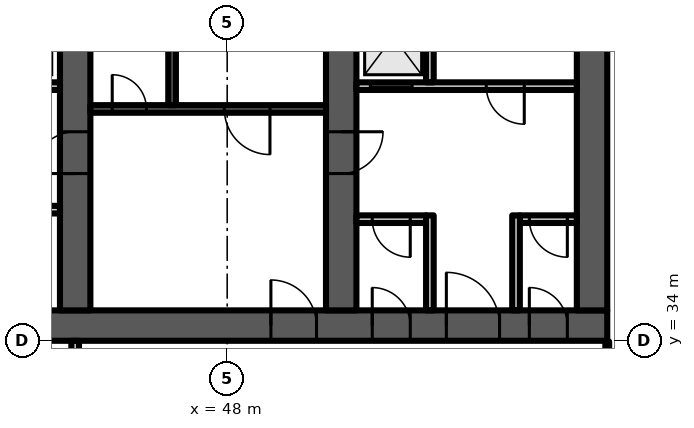
"""IFC4 building model, lengths in metres.
Left out: names, types, materials, properties, quantities, classifications, styles, units other than length and angle.
Written with IfcOpenShell. Run it as: python <this file> out.ifc"""

import sys

from ifc_helpers import new_model, si_unit, direction, frame, frame_2d, origin, place, context, subcontext, project, spatial, polyline, rectangle, outline, extrude, element, fill, save


model = new_model("IFC4")
c1 = context("Model", 3, precision=1e-05, world=origin(), true_north=direction((0.0, 1.0)))
c2 = subcontext(c1, "Body", "Model", "MODEL_VIEW")
j1 = project(units=[si_unit("LENGTHUNIT", "METRE"), si_unit("PLANEANGLEUNIT", "RADIAN")], contexts=[c1])
p1 = place(None, origin())
s1 = spatial("IfcSite", under=j1, at=p1, CompositionType="ELEMENT")
p2 = place(p1, origin())
s2 = spatial("IfcBuilding", under=s1, at=p2, CompositionType="ELEMENT")
p3 = place(p2, frame((0.0, 0.0, 151.9)))
s3 = spatial("IfcBuildingStorey", under=s2, at=p3, CompositionType="ELEMENT", Elevation=151.9)
p4 = place(p3, frame((16.0, 34.4, 0.0), z_axis=(0.0, 0.0, 1.0), x_axis=(1.0, 0.0, 0.0)))
e1 = element("IfcWall", 1, at=p4, inside=s3, PredefinedType="SHEAR", context=c2, shape_type="SweptSolid", body=[
    extrude(rectangle(XDim=42.0, YDim=0.8, at=frame_2d((21.0, 0.0))), origin(), (0.0, 0.0, 1.0), 3.6),
])
p5 = place(p4, frame((3.2, 0.0, 0.0)))
e2 = element("IfcOpeningElement", 2, at=p5, cuts=e1, PredefinedType="OPENING", context=c2, shape_type="SweptSolid", body=[
    extrude(rectangle(XDim=1.0, YDim=2.1, at=frame_2d((0.5, 1.05))), frame((0.0, 0.41, 0.0), z_axis=(0.0, -1.0, 0.0), x_axis=(1.0, 0.0, 0.0)), (0.0, 0.0, 1.0), 0.82),
])
p6 = place(p4, frame((7.65, 0.0, 0.0)))
e3 = element("IfcOpeningElement", 3, at=p6, cuts=e1, PredefinedType="OPENING", context=c2, shape_type="SweptSolid", body=[
    extrude(rectangle(XDim=1.2, YDim=2.1, at=frame_2d((0.6, 1.05))), frame((0.0, 0.41, 0.0), z_axis=(0.0, -1.0, 0.0), x_axis=(1.0, 0.0, 0.0)), (0.0, 0.0, 1.0), 0.82),
])
p7 = place(p4, frame((14.767, 0.0, 0.0)))
e4 = element("IfcOpeningElement", 4, at=p7, cuts=e1, PredefinedType="OPENING", context=c2, shape_type="SweptSolid", body=[
    extrude(rectangle(XDim=1.1, YDim=2.1, at=frame_2d((0.55, 1.05))), frame((0.0, 0.41, 0.0), z_axis=(0.0, -1.0, 0.0), x_axis=(1.0, 0.0, 0.0)), (0.0, 0.0, 1.0), 0.82),
])
p8 = place(p4, frame((19.133, 0.0, 0.0)))
e5 = element("IfcOpeningElement", 5, at=p8, cuts=e1, PredefinedType="OPENING", context=c2, shape_type="SweptSolid", body=[
    extrude(rectangle(XDim=1.1, YDim=2.1, at=frame_2d((0.55, 1.05))), frame((0.0, 0.41, 0.0), z_axis=(0.0, -1.0, 0.0), x_axis=(1.0, 0.0, 0.0)), (0.0, 0.0, 1.0), 0.82),
])
p9 = place(p4, frame((16.8, 0.0, 0.0)))
e6 = element("IfcOpeningElement", 6, at=p9, cuts=e1, PredefinedType="OPENING", context=c2, shape_type="SweptSolid", body=[
    extrude(rectangle(XDim=1.4, YDim=2.1, at=frame_2d((0.7, 1.05))), frame((0.0, 0.41, 0.0), z_axis=(0.0, -1.0, 0.0), x_axis=(1.0, 0.0, 0.0)), (0.0, 0.0, 1.0), 0.82),
])
p10 = place(p4, frame((21.767, 0.0, 0.0)))
e7 = element("IfcOpeningElement", 7, at=p10, cuts=e1, PredefinedType="OPENING", context=c2, shape_type="SweptSolid", body=[
    extrude(rectangle(XDim=1.1, YDim=2.1, at=frame_2d((0.55, 1.05))), frame((0.0, 0.41, 0.0), z_axis=(0.0, -1.0, 0.0), x_axis=(1.0, 0.0, 0.0)), (0.0, 0.0, 1.0), 0.82),
])
p11 = place(p4, frame((23.95, 0.0, 0.0)))
e8 = element("IfcOpeningElement", 8, at=p11, cuts=e1, PredefinedType="OPENING", context=c2, shape_type="SweptSolid", body=[
    extrude(rectangle(XDim=1.1, YDim=2.1, at=frame_2d((0.55, 1.05))), frame((0.0, 0.41, 0.0), z_axis=(0.0, -1.0, 0.0), x_axis=(1.0, 0.0, 0.0)), (0.0, 0.0, 1.0), 0.82),
])
p12 = place(p4, frame((26.133, 0.0, 0.0)))
e9 = element("IfcOpeningElement", 9, at=p12, cuts=e1, PredefinedType="OPENING", context=c2, shape_type="SweptSolid", body=[
    extrude(rectangle(XDim=1.1, YDim=2.1, at=frame_2d((0.55, 1.05))), frame((0.0, 0.41, 0.0), z_axis=(0.0, -1.0, 0.0), x_axis=(1.0, 0.0, 0.0)), (0.0, 0.0, 1.0), 0.82),
])
p13 = place(p4, frame((33.15, 0.0, 0.0)))
e10 = element("IfcOpeningElement", 10, at=p13, cuts=e1, PredefinedType="OPENING", context=c2, shape_type="SweptSolid", body=[
    extrude(rectangle(XDim=1.2, YDim=2.1, at=frame_2d((0.6, 1.05))), frame((0.0, 0.41, 0.0), z_axis=(0.0, -1.0, 0.0), x_axis=(1.0, 0.0, 0.0)), (0.0, 0.0, 1.0), 0.82),
])
p14 = place(p4, frame((35.817, 0.0, 0.0)))
e11 = element("IfcOpeningElement", 11, at=p14, cuts=e1, PredefinedType="OPENING", context=c2, shape_type="SweptSolid", body=[
    extrude(rectangle(XDim=1.0, YDim=2.1, at=frame_2d((0.5, 1.05))), frame((0.0, 0.41, 0.0), z_axis=(0.0, -1.0, 0.0), x_axis=(1.0, 0.0, 0.0)), (0.0, 0.0, 1.0), 0.82),
])
p15 = place(p4, frame((39.95, 0.0, 0.0)))
e12 = element("IfcOpeningElement", 12, at=p15, cuts=e1, PredefinedType="OPENING", context=c2, shape_type="SweptSolid", body=[
    extrude(rectangle(XDim=1.0, YDim=2.1, at=frame_2d((0.5, 1.05))), frame((0.0, 0.41, 0.0), z_axis=(0.0, -1.0, 0.0), x_axis=(1.0, 0.0, 0.0)), (0.0, 0.0, 1.0), 0.82),
])
p16 = place(p4, frame((37.767, 0.0, 0.0)))
e13 = element("IfcOpeningElement", 13, at=p16, cuts=e1, PredefinedType="OPENING", context=c2, shape_type="SweptSolid", body=[
    extrude(rectangle(XDim=1.4, YDim=2.1, at=frame_2d((0.7, 1.05))), frame((0.0, 0.41, 0.0), z_axis=(0.0, -1.0, 0.0), x_axis=(1.0, 0.0, 0.0)), (0.0, 0.0, 1.0), 0.82),
])
p17 = place(p3, frame((44.0, 34.8, 0.0), z_axis=(0.0, 0.0, 1.0), x_axis=(0.0, 1.0, 0.0)))
e14 = element("IfcWall", 14, at=p17, inside=s3, PredefinedType="SHEAR", context=c2, shape_type="SweptSolid", body=[
    extrude(rectangle(XDim=14.374, YDim=0.8, at=frame_2d((7.187, 0.0))), origin(), (0.0, 0.0, 1.0), 3.6),
])
p18 = place(p17, frame((11.312, 0.0, 0.0)))
e15 = element("IfcOpeningElement", 15, at=p18, cuts=e14, PredefinedType="OPENING", context=c2, shape_type="SweptSolid", body=[
    extrude(rectangle(XDim=1.0, YDim=2.1, at=frame_2d((0.5, 1.05))), frame((0.0, 0.41, 0.0), z_axis=(0.0, -1.0, 0.0), x_axis=(1.0, 0.0, 0.0)), (0.0, 0.0, 1.0), 0.82),
])
p19 = place(p17, frame((3.6, 0.0, 0.0)))
e16 = element("IfcOpeningElement", 16, at=p19, cuts=e14, PredefinedType="OPENING", context=c2, shape_type="SweptSolid", body=[
    extrude(rectangle(XDim=1.1, YDim=2.1, at=frame_2d((0.55, 1.05))), frame((0.0, 0.41, 0.0), z_axis=(0.0, -1.0, 0.0), x_axis=(1.0, 0.0, 0.0)), (0.0, 0.0, 1.0), 0.82),
])
p20 = place(p3, frame((51.0, 34.8, 0.0), z_axis=(0.0, 0.0, 1.0), x_axis=(0.0, 1.0, 0.0)))
e17 = element("IfcWall", 17, at=p20, inside=s3, PredefinedType="SHEAR", context=c2, shape_type="SweptSolid", body=[
    extrude(rectangle(XDim=13.762, YDim=0.8, at=frame_2d((6.881, 0.0))), origin(), (0.0, 0.0, 1.0), 3.6),
])
p21 = place(p20, frame((3.6, 0.0, 0.0)))
e18 = element("IfcOpeningElement", 18, at=p21, cuts=e17, PredefinedType="OPENING", context=c2, shape_type="SweptSolid", body=[
    extrude(rectangle(XDim=1.1, YDim=2.1, at=frame_2d((0.55, 1.05))), frame((0.0, 0.41, 0.0), z_axis=(0.0, -1.0, 0.0), x_axis=(1.0, 0.0, 0.0)), (0.0, 0.0, 1.0), 0.82),
])
p22 = place(p3, frame((57.6, 34.8, 0.0), z_axis=(0.0, 0.0, 1.0), x_axis=(0.0, 1.0, 0.0)))
e19 = element("IfcWall", 19, at=p22, inside=s3, PredefinedType="SHEAR", context=c2, shape_type="SweptSolid", body=[
    extrude(rectangle(XDim=13.184, YDim=0.8, at=frame_2d((6.592, 0.0))), origin(), (0.0, 0.0, 1.0), 3.6),
])
p23 = place(p3, frame((37.4, 40.7, 0.0), z_axis=(0.0, 0.0, 1.0), x_axis=(1.0, 0.0, 0.0)))
e20 = element("IfcWall", 20, at=p23, inside=s3, PredefinedType="PARTITIONING", context=c2, shape_type="SweptSolid", body=[
    extrude(rectangle(XDim=6.2, YDim=0.2, at=frame_2d((3.1, 0.0))), origin(), (0.0, 0.0, 1.0), 3.2),
])
p24 = place(p23, frame((0.367, 0.0, 0.0)))
e21 = element("IfcOpeningElement", 21, at=p24, cuts=e20, PredefinedType="OPENING", context=c2, shape_type="SweptSolid", body=[
    extrude(rectangle(XDim=1.1, YDim=2.1, at=frame_2d((0.55, 1.05))), frame((0.0, 0.11, 0.0), z_axis=(0.0, -1.0, 0.0), x_axis=(1.0, 0.0, 0.0)), (0.0, 0.0, 1.0), 0.22),
])
p25 = place(p23, frame((2.55, 0.0, 0.0)))
e22 = element("IfcOpeningElement", 22, at=p25, cuts=e20, PredefinedType="OPENING", context=c2, shape_type="SweptSolid", body=[
    extrude(rectangle(XDim=1.1, YDim=2.1, at=frame_2d((0.55, 1.05))), frame((0.0, 0.11, 0.0), z_axis=(0.0, -1.0, 0.0), x_axis=(1.0, 0.0, 0.0)), (0.0, 0.0, 1.0), 0.22),
])
p26 = place(p23, frame((4.733, 0.0, 0.0)))
e23 = element("IfcOpeningElement", 23, at=p26, cuts=e20, PredefinedType="OPENING", context=c2, shape_type="SweptSolid", body=[
    extrude(rectangle(XDim=1.1, YDim=2.1, at=frame_2d((0.55, 1.05))), frame((0.0, 0.11, 0.0), z_axis=(0.0, -1.0, 0.0), x_axis=(1.0, 0.0, 0.0)), (0.0, 0.0, 1.0), 0.22),
])
p27 = place(p3, origin())
e24 = element("IfcWall", 24, at=p27, inside=s3, PredefinedType="PARTITIONING", context=c2, shape_type="SweptSolid", body=[
    extrude(outline(polyline([(41.567, 37.1), (39.433, 37.1), (39.433, 34.8), (39.233, 34.8), (39.233, 37.65), (37.4, 37.65), (37.4, 37.85), (39.233, 37.85), (39.433, 37.85), (39.433, 37.3), (41.567, 37.3), (41.567, 37.55), (41.767, 37.55), (43.6, 37.55), (43.6, 37.35), (41.767, 37.35), (41.767, 34.8), (41.567, 34.8), (41.567, 37.1)])), origin(), (0.0, 0.0, 1.0), 3.2),
])
p28 = place(p3, origin())
e25 = element("IfcWall", 25, at=p28, inside=s3, PredefinedType="PARTITIONING", context=c2, shape_type="SweptSolid", body=[
    extrude(outline(polyline([(39.433, 40.8), (39.233, 40.8), (39.233, 43.8), (37.4, 43.8), (37.4, 44.0), (43.6, 44.0), (43.6, 43.8), (41.767, 43.8), (41.767, 40.8), (41.567, 40.8), (41.567, 43.8), (39.433, 43.8), (39.433, 40.8)])), origin(), (0.0, 0.0, 1.0), 3.2),
])
p29 = place(p3, frame((44.4, 40.1, 0.0), z_axis=(0.0, 0.0, 1.0), x_axis=(1.0, 0.0, 0.0)))
e26 = element("IfcWall", 26, at=p29, inside=s3, PredefinedType="SHEAR", context=c2, shape_type="SweptSolid", body=[
    extrude(rectangle(XDim=6.2, YDim=0.2, at=frame_2d((3.1, 0.0))), origin(), (0.0, 0.0, 1.0), 3.2),
])
p30 = place(p29, frame((3.525, 0.0, 0.0)))
e27 = element("IfcOpeningElement", 27, at=p30, cuts=e26, PredefinedType="OPENING", context=c2, shape_type="SweptSolid", body=[
    extrude(rectangle(XDim=1.2, YDim=2.1, at=frame_2d((0.6, 1.05))), frame((0.0, 0.11, 0.0), z_axis=(0.0, -1.0, 0.0), x_axis=(1.0, 0.0, 0.0)), (0.0, 0.0, 1.0), 0.22),
])
p31 = place(p29, frame((0.575, 0.0, 0.0)))
e28 = element("IfcOpeningElement", 28, at=p31, cuts=e26, PredefinedType="OPENING", context=c2, shape_type="SweptSolid", body=[
    extrude(rectangle(XDim=0.9, YDim=2.1, at=frame_2d((0.45, 1.05))), frame((0.0, 0.11, 0.0), z_axis=(0.0, -1.0, 0.0), x_axis=(1.0, 0.0, 0.0)), (0.0, 0.0, 1.0), 0.22),
])
p32 = place(p3, frame((46.55, 40.2, 0.0), z_axis=(0.0, 0.0, 1.0), x_axis=(0.0, 1.0, 0.0)))
e29 = element("IfcWall", 29, at=p32, inside=s3, PredefinedType="SHEAR", context=c2, shape_type="SweptSolid", body=[
    extrude(rectangle(XDim=7.2, YDim=0.2, at=frame_2d((3.6, 0.0))), origin(), (0.0, 0.0, 1.0), 3.2),
])
p33 = place(p3, frame((51.4, 37.2, 0.0), z_axis=(0.0, 0.0, 1.0), x_axis=(1.0, 0.0, 0.0)))
e30 = element("IfcWall", 30, at=p33, inside=s3, PredefinedType="PARTITIONING", context=c2, shape_type="SweptSolid", body=[
    extrude(rectangle(XDim=1.833, YDim=0.2, at=frame_2d((0.917, 0.0))), origin(), (0.0, 0.0, 1.0), 3.2),
])
p34 = place(p33, frame((0.417, 0.0, 0.0)))
e31 = element("IfcOpeningElement", 31, at=p34, cuts=e30, PredefinedType="OPENING", context=c2, shape_type="SweptSolid", body=[
    extrude(rectangle(XDim=1.0, YDim=2.1, at=frame_2d((0.5, 1.05))), frame((0.0, 0.11, 0.0), z_axis=(0.0, -1.0, 0.0), x_axis=(1.0, 0.0, 0.0)), (0.0, 0.0, 1.0), 0.22),
])
p35 = place(p3, frame((55.7, 37.2, 0.0), z_axis=(0.0, 0.0, 1.0), x_axis=(1.0, 0.0, 0.0)))
e32 = element("IfcWall", 32, at=p35, inside=s3, PredefinedType="PARTITIONING", context=c2, shape_type="SweptSolid", body=[
    extrude(rectangle(XDim=1.5, YDim=0.2, at=frame_2d((0.75, 0.0))), origin(), (0.0, 0.0, 1.0), 3.2),
])
p36 = place(p35, frame((0.25, 0.0, 0.0)))
e33 = element("IfcOpeningElement", 33, at=p36, cuts=e32, PredefinedType="OPENING", context=c2, shape_type="SweptSolid", body=[
    extrude(rectangle(XDim=1.0, YDim=2.1, at=frame_2d((0.5, 1.05))), frame((0.0, 0.11, 0.0), z_axis=(0.0, -1.0, 0.0), x_axis=(1.0, 0.0, 0.0)), (0.0, 0.0, 1.0), 0.22),
])
p37 = place(p3, frame((51.4, 40.7, 0.0), z_axis=(0.0, 0.0, 1.0), x_axis=(1.0, 0.0, 0.0)))
e34 = element("IfcWall", 34, at=p37, inside=s3, PredefinedType="PARTITIONING", context=c2, shape_type="SweptSolid", body=[
    extrude(rectangle(XDim=5.8, YDim=0.2, at=frame_2d((2.9, 0.0))), origin(), (0.0, 0.0, 1.0), 3.2),
])
p38 = place(p37, frame((0.367, 0.0, 0.0)))
e35 = element("IfcOpeningElement", 35, at=p38, cuts=e34, PredefinedType="OPENING", context=c2, shape_type="SweptSolid", body=[
    extrude(rectangle(XDim=1.1, YDim=2.1, at=frame_2d((0.55, 1.05))), frame((0.0, 0.11, 0.0), z_axis=(0.0, -1.0, 0.0), x_axis=(1.0, 0.0, 0.0)), (0.0, 0.0, 1.0), 0.22),
])
p39 = place(p37, frame((3.417, 0.0, 0.0)))
e36 = element("IfcOpeningElement", 36, at=p39, cuts=e34, PredefinedType="OPENING", context=c2, shape_type="SweptSolid", body=[
    extrude(rectangle(XDim=1.0, YDim=2.1, at=frame_2d((0.5, 1.05))), frame((0.0, 0.11, 0.0), z_axis=(0.0, -1.0, 0.0), x_axis=(1.0, 0.0, 0.0)), (0.0, 0.0, 1.0), 0.22),
])
p40 = place(p3, origin())
e37 = element("IfcWall", 37, at=p40, inside=s3, PredefinedType="PARTITIONING", context=c2, shape_type="SweptSolid", body=[
    extrude(outline(polyline([(53.233, 34.8), (53.233, 37.3), (53.433, 37.3), (53.433, 34.8), (53.233, 34.8)])), origin(), (0.0, 0.0, 1.0), 3.2),
])
p41 = place(p3, origin())
e38 = element("IfcWall", 38, at=p41, inside=s3, PredefinedType="PARTITIONING", context=c2, shape_type="SweptSolid", body=[
    extrude(outline(polyline([(55.5, 34.8), (55.5, 37.3), (55.7, 37.3), (55.7, 34.8), (55.5, 34.8)])), origin(), (0.0, 0.0, 1.0), 3.2),
])
p42 = place(p3, origin())
e39 = element("IfcWall", 39, at=p42, inside=s3, PredefinedType="PARTITIONING", context=c2, shape_type="SweptSolid", body=[
    extrude(outline(polyline([(53.433, 40.8), (53.433, 43.8), (53.233, 43.8), (53.233, 40.8), (53.433, 40.8)])), origin(), (0.0, 0.0, 1.0), 3.2),
])
p43 = place(p3, frame((44.0, 30.5, 0.0), z_axis=(0.0, 0.0, 1.0), x_axis=(0.0, 1.0, 0.0)))
e40 = element("IfcWall", 40, at=p43, inside=s3, PredefinedType="PARTITIONING", context=c2, shape_type="SweptSolid", body=[
    extrude(rectangle(XDim=3.5, YDim=0.2, at=frame_2d((1.75, 0.0))), origin(), (0.0, 0.0, 1.0), 3.2),
])
p44 = place(p43, frame((1.2, 0.0, 0.0)))
e41 = element("IfcOpeningElement", 41, at=p44, cuts=e40, PredefinedType="OPENING", context=c2, shape_type="SweptSolid", body=[
    extrude(rectangle(XDim=1.1, YDim=2.1, at=frame_2d((0.55, 1.05))), frame((0.0, 0.11, 0.0), z_axis=(0.0, -1.0, 0.0), x_axis=(1.0, 0.0, 0.0)), (0.0, 0.0, 1.0), 0.22),
])
p45 = place(p3, frame((58.0, 31.4, 0.0), z_axis=(0.0, 0.0, 1.0), x_axis=(0.0, 1.0, 0.0)))
e42 = element("IfcWall", 42, at=p45, inside=s3, PredefinedType="PARTITIONING", context=c2, shape_type="SweptSolid", body=[
    extrude(rectangle(XDim=2.58, YDim=0.1, at=frame_2d((1.29, 0.0))), origin(), (0.0, 0.0, 1.0), 3.2),
])
p46 = place(p45, frame((0.9, 0.0, 0.0)))
e43 = element("IfcOpeningElement", 43, at=p46, cuts=e42, PredefinedType="OPENING", context=c2, shape_type="SweptSolid", body=[
    extrude(rectangle(XDim=1.0, YDim=2.1, at=frame_2d((0.5, 1.05))), frame((0.0, 0.06, 0.0), z_axis=(0.0, -1.0, 0.0), x_axis=(1.0, 0.0, 0.0)), (0.0, 0.0, 1.0), 0.12),
])
p47 = place(p30, origin())
e44 = element("IfcDoor", 44, at=p47, inside=s3, OperationType="SINGLE_SWING_RIGHT", PredefinedType="DOOR", context=c2, shape_type="SweptSolid", body=[
    extrude(rectangle(XDim=1.2, YDim=2.1, at=frame_2d((0.6, 1.05))), frame((0.0, 0.025, 0.0), z_axis=(0.0, -1.0, 0.0), x_axis=(1.0, 0.0, 0.0)), (0.0, 0.0, 1.0), 0.05),
])
fill(e27, e44)
p48 = place(p31, origin())
e45 = element("IfcDoor", 45, at=p48, inside=s3, OperationType="SINGLE_SWING_LEFT", PredefinedType="DOOR", context=c2, shape_type="SweptSolid", body=[
    extrude(rectangle(XDim=0.9, YDim=2.1, at=frame_2d((0.45, 1.05))), frame((0.0, 0.025, 0.0), z_axis=(0.0, -1.0, 0.0), x_axis=(1.0, 0.0, 0.0)), (0.0, 0.0, 1.0), 0.05),
])
fill(e28, e45)
p49 = place(p13, origin())
e46 = element("IfcDoor", 46, at=p49, inside=s3, OperationType="SINGLE_SWING_LEFT", PredefinedType="DOOR", context=c2, shape_type="SweptSolid", body=[
    extrude(rectangle(XDim=1.2, YDim=2.1, at=frame_2d((0.6, 1.05))), frame((0.0, 0.025, 0.0), z_axis=(0.0, -1.0, 0.0), x_axis=(1.0, 0.0, 0.0)), (0.0, 0.0, 1.0), 0.05),
])
fill(e10, e46)
p50 = place(p14, origin())
e47 = element("IfcDoor", 47, at=p50, inside=s3, OperationType="SINGLE_SWING_LEFT", PredefinedType="DOOR", context=c2, shape_type="SweptSolid", body=[
    extrude(rectangle(XDim=1.0, YDim=2.1, at=frame_2d((0.5, 1.05))), frame((0.0, 0.4, 0.0), z_axis=(0.0, -1.0, 0.0), x_axis=(1.0, 0.0, 0.0)), (0.0, 0.0, 1.0), 0.8),
])
fill(e11, e47)
p51 = place(p34, origin())
e48 = element("IfcDoor", 48, at=p51, inside=s3, OperationType="SINGLE_SWING_RIGHT", PredefinedType="DOOR", context=c2, shape_type="SweptSolid", body=[
    extrude(rectangle(XDim=1.0, YDim=2.1, at=frame_2d((0.5, 1.05))), frame((0.0, 0.025, 0.0), z_axis=(0.0, -1.0, 0.0), x_axis=(1.0, 0.0, 0.0)), (0.0, 0.0, 1.0), 0.05),
])
fill(e31, e48)
p52 = place(p15, origin())
e49 = element("IfcDoor", 49, at=p52, inside=s3, OperationType="SINGLE_SWING_LEFT", PredefinedType="DOOR", context=c2, shape_type="SweptSolid", body=[
    extrude(rectangle(XDim=1.0, YDim=2.1, at=frame_2d((0.5, 1.05))), frame((0.0, 0.4, 0.0), z_axis=(0.0, -1.0, 0.0), x_axis=(1.0, 0.0, 0.0)), (0.0, 0.0, 1.0), 0.8),
])
fill(e12, e49)
p53 = place(p36, origin())
e50 = element("IfcDoor", 50, at=p53, inside=s3, OperationType="SINGLE_SWING_RIGHT", PredefinedType="DOOR", context=c2, shape_type="SweptSolid", body=[
    extrude(rectangle(XDim=1.0, YDim=2.1, at=frame_2d((0.5, 1.05))), frame((0.0, 0.025, 0.0), z_axis=(0.0, -1.0, 0.0), x_axis=(1.0, 0.0, 0.0)), (0.0, 0.0, 1.0), 0.05),
])
fill(e33, e50)
p54 = place(p16, origin())
e51 = element("IfcDoor", 51, at=p54, inside=s3, OperationType="DOUBLE_DOOR_SINGLE_SWING", PredefinedType="DOOR", context=c2, shape_type="SweptSolid", body=[
    extrude(rectangle(XDim=1.4, YDim=2.1, at=frame_2d((0.7, 1.05))), frame((0.0, 0.025, 0.0), z_axis=(0.0, -1.0, 0.0), x_axis=(1.0, 0.0, 0.0)), (0.0, 0.0, 1.0), 0.05),
])
fill(e13, e51)
p55 = place(p38, origin())
e52 = element("IfcDoor", 52, at=p55, inside=s3, OperationType="DOUBLE_DOOR_SLIDING", PredefinedType="DOOR", context=c2, shape_type="SweptSolid", body=[
    extrude(rectangle(XDim=1.1, YDim=2.1, at=frame_2d((0.55, 1.05))), frame((0.0, 0.025, 0.0), z_axis=(0.0, -1.0, 0.0), x_axis=(1.0, 0.0, 0.0)), (0.0, 0.0, 1.0), 0.05),
])
fill(e35, e52)
p56 = place(p39, origin())
e53 = element("IfcDoor", 53, at=p56, inside=s3, OperationType="SINGLE_SWING_RIGHT", PredefinedType="DOOR", context=c2, shape_type="SweptSolid", body=[
    extrude(rectangle(XDim=1.0, YDim=2.1, at=frame_2d((0.5, 1.05))), frame((0.0, 0.025, 0.0), z_axis=(0.0, -1.0, 0.0), x_axis=(1.0, 0.0, 0.0)), (0.0, 0.0, 1.0), 0.05),
])
fill(e36, e53)
p57 = place(p19, origin())
e54 = element("IfcDoor", 54, at=p57, inside=s3, OperationType="SINGLE_SWING_LEFT", PredefinedType="DOOR", context=c2, shape_type="SweptSolid", body=[
    extrude(rectangle(XDim=1.1, YDim=2.1, at=frame_2d((0.55, 1.05))), frame((0.0, 0.025, 0.0), z_axis=(0.0, -1.0, 0.0), x_axis=(1.0, 0.0, 0.0)), (0.0, 0.0, 1.0), 0.05),
])
fill(e16, e54)
p58 = place(p21, origin())
e55 = element("IfcDoor", 55, at=p58, inside=s3, OperationType="SINGLE_SWING_RIGHT", PredefinedType="DOOR", context=c2, shape_type="SweptSolid", body=[
    extrude(rectangle(XDim=1.1, YDim=2.1, at=frame_2d((0.55, 1.05))), frame((0.0, 0.025, 0.0), z_axis=(0.0, -1.0, 0.0), x_axis=(1.0, 0.0, 0.0)), (0.0, 0.0, 1.0), 0.05),
])
fill(e18, e55)
save(model, sys.argv[1])
